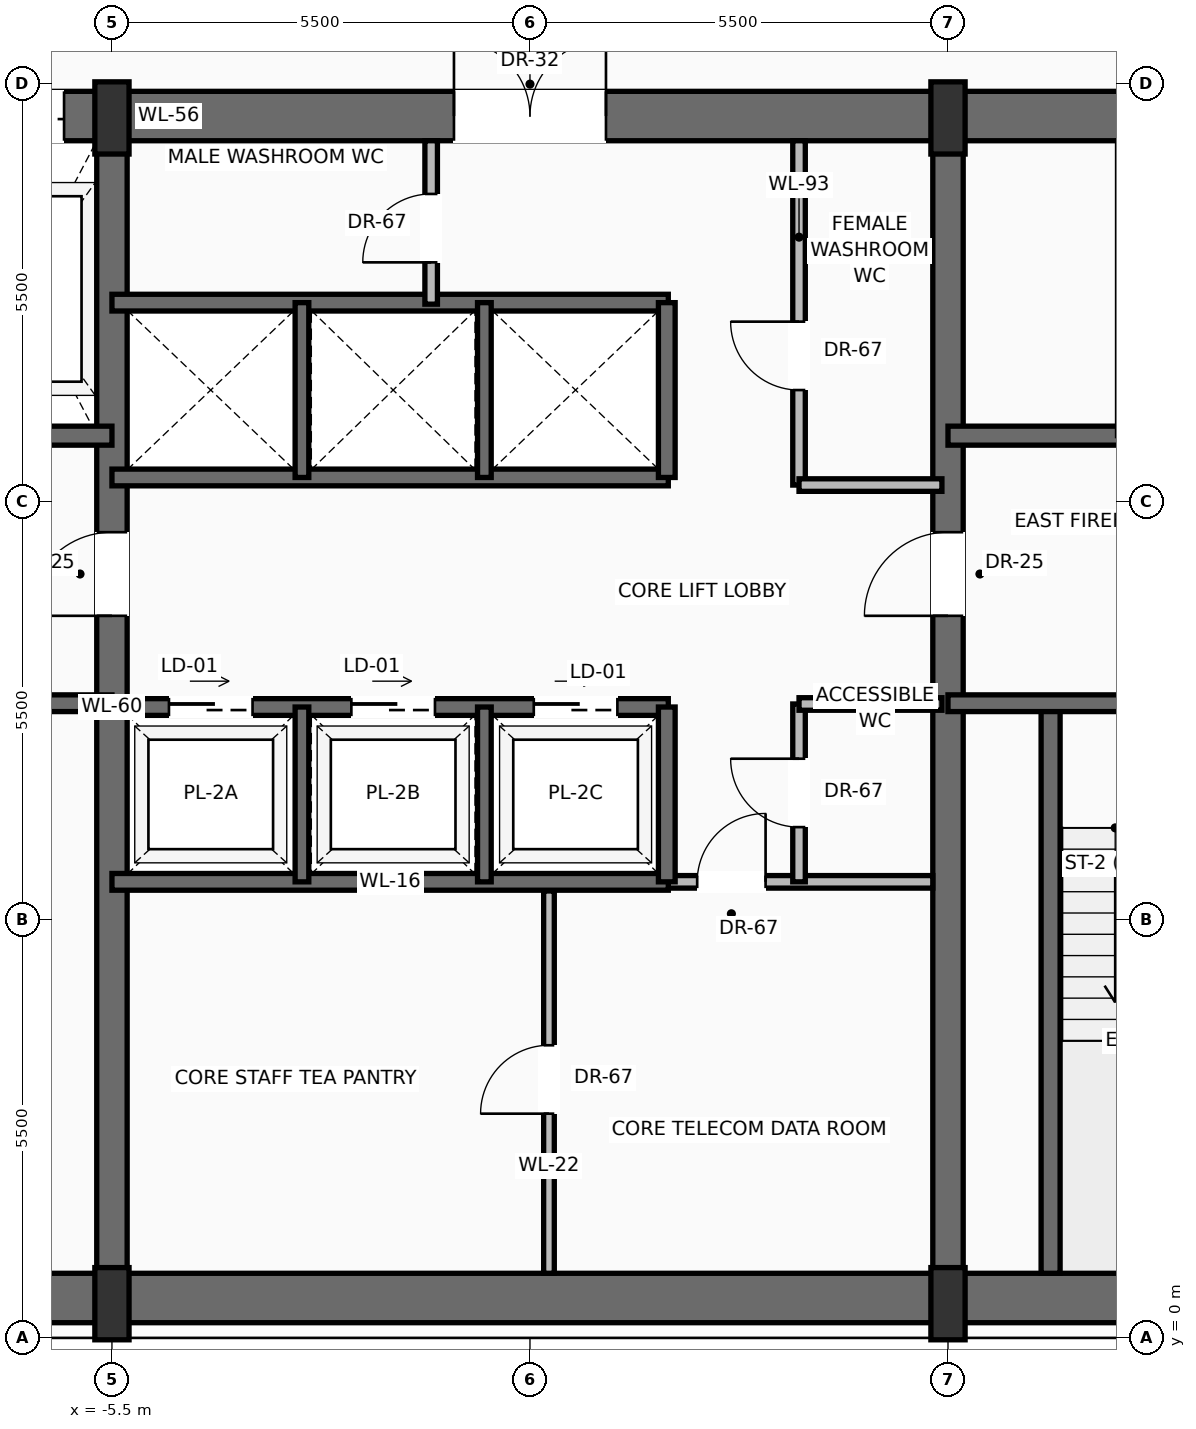
"""IFC4 building model, lengths in metres.
Left out: names, types, materials, properties, quantities, classifications, styles, units other than length and angle.
Written with IfcOpenShell. Run it as: python <this file> out.ifc"""

import sys

from ifc_helpers import new_model, si_unit, direction, frame, frame_2d, origin, origin_2d, place, context, subcontext, project, spatial, rectangle, extrude, source, transform, mapped, element, fill, save


model = new_model("IFC4")
c1 = context("Model", 3, precision=1e-05, world=origin(), true_north=direction((0.0, 1.0)))
c2 = subcontext(c1, "Body", "Model", "MODEL_VIEW")
j1 = project(units=[si_unit("LENGTHUNIT", "METRE"), si_unit("PLANEANGLEUNIT", "RADIAN")], contexts=[c1])
p1 = place(None, origin())
s1 = spatial("IfcSite", under=j1, at=p1, CompositionType="ELEMENT")
p2 = place(p1, origin())
s2 = spatial("IfcBuilding", under=s1, at=p2, CompositionType="ELEMENT")
p3 = place(p2, frame((0.0, 0.0, 140.4)))
s3 = spatial("IfcBuildingStorey", under=s2, at=p3, CompositionType="ELEMENT", Elevation=140.4)
p4 = place(p3, frame((-10.65, 0.525, 0.0), z_axis=(0.0, 0.0, 1.0), x_axis=(1.0, 0.0, 0.0)))
e1 = element("IfcWall", 1, at=p4, inside=s3, PredefinedType="SHEAR", context=c2, shape_type="SweptSolid", body=[
    extrude(rectangle(XDim=21.3, YDim=0.65, at=frame_2d((10.65, 0.0))), origin(), (0.0, 0.0, 1.0), 3.47),
])
p5 = place(p3, frame((-10.8, 16.075, 0.0), z_axis=(0.0, 0.0, 1.0), x_axis=(1.0, 0.0, 0.0)))
e2 = element("IfcWall", 2, at=p5, inside=s3, PredefinedType="SHEAR", context=c2, shape_type="SweptSolid", body=[
    extrude(rectangle(XDim=21.6, YDim=0.65, at=frame_2d((10.8, 0.0))), origin(), (0.0, 0.0, 1.0), 3.47),
])
p6 = place(p5, frame((3.37, 0.0, 0.0)))
e3 = element("IfcOpeningElement", 3, at=p6, cuts=e2, PredefinedType="OPENING", context=c2, shape_type="SweptSolid", body=[
    extrude(rectangle(XDim=1.3, YDim=2.3, at=frame_2d((0.65, 1.15))), frame((0.0, 0.335, 0.0), z_axis=(0.0, -1.0, 0.0), x_axis=(1.0, 0.0, 0.0)), (0.0, 0.0, 1.0), 0.67),
])
p7 = place(p5, frame((9.8, 0.0, 0.0)))
e4 = element("IfcOpeningElement", 4, at=p7, cuts=e2, PredefinedType="OPENING", context=c2, shape_type="SweptSolid", body=[
    extrude(rectangle(XDim=2.0, YDim=2.4, at=frame_2d((1.0, 1.2))), frame((0.0, 0.335, 0.0), z_axis=(0.0, -1.0, 0.0), x_axis=(1.0, 0.0, 0.0)), (0.0, 0.0, 1.0), 0.67),
])
p8 = place(p3, frame((-5.5, 0.525, 0.0), z_axis=(0.0, 0.0, 1.0), x_axis=(0.0, 1.0, 0.0)))
e5 = element("IfcWall", 5, at=p8, inside=s3, PredefinedType="SHEAR", context=c2, shape_type="SweptSolid", body=[
    extrude(rectangle(XDim=15.55, YDim=0.4, at=frame_2d((7.775, 0.0))), origin(), (0.0, 0.0, 1.0), 3.47),
])
p9 = place(p8, frame((8.975, 0.0, 0.0)))
e6 = element("IfcOpeningElement", 6, at=p9, cuts=e5, PredefinedType="OPENING", context=c2, shape_type="SweptSolid", body=[
    extrude(rectangle(XDim=1.1, YDim=2.2, at=frame_2d((0.55, 1.1))), frame((0.0, 0.21, 0.0), z_axis=(0.0, -1.0, 0.0), x_axis=(1.0, 0.0, 0.0)), (0.0, 0.0, 1.0), 0.42),
])
p10 = place(p3, frame((5.5, 0.525, 0.0), z_axis=(0.0, 0.0, 1.0), x_axis=(0.0, 1.0, 0.0)))
e7 = element("IfcWall", 7, at=p10, inside=s3, PredefinedType="SHEAR", context=c2, shape_type="SweptSolid", body=[
    extrude(rectangle(XDim=15.55, YDim=0.4, at=frame_2d((7.775, 0.0))), origin(), (0.0, 0.0, 1.0), 3.47),
])
p11 = place(p10, frame((8.975, 0.0, 0.0)))
e8 = element("IfcOpeningElement", 8, at=p11, cuts=e7, PredefinedType="OPENING", context=c2, shape_type="SweptSolid", body=[
    extrude(rectangle(XDim=1.1, YDim=2.2, at=frame_2d((0.55, 1.1))), frame((0.0, 0.21, 0.0), z_axis=(0.0, -1.0, 0.0), x_axis=(1.0, 0.0, 0.0)), (0.0, 0.0, 1.0), 0.42),
])
m1 = source(origin(), c2, "Body", "SweptSolid", [
    extrude(rectangle(XDim=0.45, YDim=0.95, at=origin_2d()), origin(), (0.0, 0.0, 1.0), 3.7),
])
for number, where, z_axis, x_axis in (
    (9, (-5.5, 0.45, 0.0), (0.0, 0.0, 1.0), (1.0, 0.0, 0.0)),
    (10, (5.5, 0.45, 0.0), (0.0, 0.0, 1.0), (1.0, 0.0, 0.0)),
    (11, (-5.5, 16.05, 0.0), (0.0, 0.0, 1.0), (1.0, 0.0, 0.0)),
    (12, (5.5, 16.05, 0.0), (0.0, 0.0, 1.0), (1.0, 0.0, 0.0)),
):
    element("IfcColumn", number, at=place(p3, frame(where, z_axis=z_axis, x_axis=x_axis)), inside=s3, PredefinedType="PILASTER", context=c2, shape_type="MappedRepresentation", body=[
        mapped(m1, transform((0.0, 0.0, 0.0), scale=1.0)),
    ])
p12 = place(p3, frame((-5.5, 8.35, 0.0), z_axis=(0.0, 0.0, 1.0), x_axis=(-1.0, 0.0, 0.0)))
e13 = element("IfcWall", 13, at=p12, inside=s3, PredefinedType="SOLIDWALL", context=c2, shape_type="SweptSolid", body=[
    extrude(rectangle(XDim=4.65, YDim=0.22, at=frame_2d((2.325, 0.0))), origin(), (0.0, 0.0, 1.0), 3.47),
])
p13 = place(p12, frame((2.5, 0.0, 0.0)))
e14 = element("IfcOpeningElement", 14, at=p13, cuts=e13, PredefinedType="OPENING", context=c2, shape_type="SweptSolid", body=[
    extrude(rectangle(XDim=1.15, YDim=2.2, at=frame_2d((0.575, 1.1))), frame((0.0, 0.12, 0.0), z_axis=(0.0, -1.0, 0.0), x_axis=(1.0, 0.0, 0.0)), (0.0, 0.0, 1.0), 0.24),
])
p14 = place(p3, frame((-5.5, 11.87, 0.0), z_axis=(0.0, 0.0, 1.0), x_axis=(-1.0, 0.0, 0.0)))
e15 = element("IfcWall", 15, at=p14, inside=s3, PredefinedType="SOLIDWALL", context=c2, shape_type="SweptSolid", body=[
    extrude(rectangle(XDim=4.65, YDim=0.25, at=frame_2d((2.325, 0.0))), origin(), (0.0, 0.0, 1.0), 3.47),
])
p15 = place(p14, frame((2.95, 0.0, 0.0)))
e16 = element("IfcOpeningElement", 16, at=p15, cuts=e15, PredefinedType="OPENING", context=c2, shape_type="SweptSolid", body=[
    extrude(rectangle(XDim=1.2, YDim=2.25, at=frame_2d((0.6, 1.125))), frame((0.0, 0.135, 0.0), z_axis=(0.0, -1.0, 0.0), x_axis=(1.0, 0.0, 0.0)), (0.0, 0.0, 1.0), 0.27),
])
p16 = place(p3, frame((6.85, 0.85, 0.0), z_axis=(0.0, 0.0, 1.0), x_axis=(0.0, 1.0, 0.0)))
e17 = element("IfcWall", 17, at=p16, inside=s3, PredefinedType="SOLIDWALL", context=c2, shape_type="SweptSolid", body=[
    extrude(rectangle(XDim=7.5, YDim=0.25, at=frame_2d((3.75, 0.0))), origin(), (0.0, 0.0, 1.0), 3.47),
])
p17 = place(p3, frame((10.15, 8.35, 0.0), z_axis=(0.0, 0.0, 1.0), x_axis=(-1.0, 0.0, 0.0)))
e18 = element("IfcWall", 18, at=p17, inside=s3, PredefinedType="SOLIDWALL", context=c2, shape_type="SweptSolid", body=[
    extrude(rectangle(XDim=4.65, YDim=0.22, at=frame_2d((2.325, 0.0))), origin(), (0.0, 0.0, 1.0), 3.47),
])
p18 = place(p17, frame((1.0, 0.0, 0.0)))
e19 = element("IfcOpeningElement", 19, at=p18, cuts=e18, PredefinedType="OPENING", context=c2, shape_type="SweptSolid", body=[
    extrude(rectangle(XDim=1.15, YDim=2.2, at=frame_2d((0.575, 1.1))), frame((0.0, 0.12, 0.0), z_axis=(0.0, -1.0, 0.0), x_axis=(1.0, 0.0, 0.0)), (0.0, 0.0, 1.0), 0.24),
])
p19 = place(p3, frame((10.15, 11.87, 0.0), z_axis=(0.0, 0.0, 1.0), x_axis=(-1.0, 0.0, 0.0)))
e20 = element("IfcWall", 20, at=p19, inside=s3, PredefinedType="SOLIDWALL", context=c2, shape_type="SweptSolid", body=[
    extrude(rectangle(XDim=4.65, YDim=0.25, at=frame_2d((2.325, 0.0))), origin(), (0.0, 0.0, 1.0), 3.47),
])
p20 = place(p19, frame((0.5, 0.0, 0.0)))
e21 = element("IfcOpeningElement", 21, at=p20, cuts=e20, PredefinedType="OPENING", context=c2, shape_type="SweptSolid", body=[
    extrude(rectangle(XDim=1.2, YDim=2.25, at=frame_2d((0.6, 1.125))), frame((0.0, 0.135, 0.0), z_axis=(0.0, -1.0, 0.0), x_axis=(1.0, 0.0, 0.0)), (0.0, 0.0, 1.0), 0.27),
])
p21 = place(p3, frame((1.82, 6.0, 0.0), z_axis=(0.0, 0.0, 1.0), x_axis=(1.0, 0.0, 0.0)))
e22 = element("IfcWall", 22, at=p21, inside=s3, PredefinedType="PARTITIONING", context=c2, shape_type="SweptSolid", body=[
    extrude(rectangle(XDim=3.48, YDim=0.165, at=frame_2d((1.74, 0.0))), origin(), (0.0, 0.0, 1.0), 3.462),
])
p22 = place(p21, frame((0.38, 0.0, 0.0)))
e23 = element("IfcOpeningElement", 23, at=p22, cuts=e22, PredefinedType="OPENING", context=c2, shape_type="SweptSolid", body=[
    extrude(rectangle(XDim=0.9, YDim=2.1, at=frame_2d((0.45, 1.05))), frame((0.0, 0.093, 0.0), z_axis=(0.0, -1.0, 0.0), x_axis=(1.0, 0.0, 0.0)), (0.0, 0.0, 1.0), 0.185),
])
p23 = place(p3, frame((0.25, 0.85, 0.0), z_axis=(0.0, 0.0, 1.0), x_axis=(0.0, 1.0, 0.0)))
e24 = element("IfcWall", 24, at=p23, inside=s3, PredefinedType="PARTITIONING", context=c2, shape_type="SweptSolid", body=[
    extrude(rectangle(XDim=5.03, YDim=0.14, at=frame_2d((2.515, 0.0))), origin(), (0.0, 0.0, 1.0), 3.462),
])
p24 = place(p23, frame((2.1, 0.0, 0.0)))
e25 = element("IfcOpeningElement", 25, at=p24, cuts=e24, PredefinedType="OPENING", context=c2, shape_type="SweptSolid", body=[
    extrude(rectangle(XDim=0.9, YDim=2.1, at=frame_2d((0.45, 1.05))), frame((0.0, 0.08, 0.0), z_axis=(0.0, -1.0, 0.0), x_axis=(1.0, 0.0, 0.0)), (0.0, 0.0, 1.0), 0.16),
])
p25 = place(p3, frame((3.54, 6.0, 0.0), z_axis=(0.0, 0.0, 1.0), x_axis=(0.0, 1.0, 0.0)))
e26 = element("IfcWall", 26, at=p25, inside=s3, PredefinedType="PARTITIONING", context=c2, shape_type="SweptSolid", body=[
    extrude(rectangle(XDim=2.34, YDim=0.165, at=frame_2d((1.17, 0.0))), origin(), (0.0, 0.0, 1.0), 3.462),
])
p26 = place(p25, frame((0.72, 0.0, 0.0)))
e27 = element("IfcOpeningElement", 27, at=p26, cuts=e26, PredefinedType="OPENING", context=c2, shape_type="SweptSolid", body=[
    extrude(rectangle(XDim=0.9, YDim=2.1, at=frame_2d((0.45, 1.05))), frame((0.0, 0.093, 0.0), z_axis=(0.0, -1.0, 0.0), x_axis=(1.0, 0.0, 0.0)), (0.0, 0.0, 1.0), 0.185),
])
p27 = place(p3, frame((3.54, 8.34, 0.0), z_axis=(0.0, 0.0, 1.0), x_axis=(1.0, 0.0, 0.0)))
e28 = element("IfcWall", 28, at=p27, inside=s3, PredefinedType="PARTITIONING", context=c2, shape_type="SweptSolid", body=[
    extrude(rectangle(XDim=1.88, YDim=0.165, at=frame_2d((0.94, 0.0))), origin(), (0.0, 0.0, 1.0), 3.462),
])
p28 = place(p3, frame((-5.5, 6.0, 0.0), z_axis=(0.0, 0.0, 1.0), x_axis=(1.0, 0.0, 0.0)))
e29 = element("IfcWall", 29, at=p28, inside=s3, PredefinedType="SOLIDWALL", context=c2, shape_type="SweptSolid", body=[
    extrude(rectangle(XDim=7.32, YDim=0.22, at=frame_2d((3.66, 0.0))), origin(), (0.0, 0.0, 1.0), 3.47),
])
p29 = place(p3, frame((-5.5, 8.3, 0.0), z_axis=(0.0, 0.0, 1.0), x_axis=(1.0, 0.0, 0.0)))
e30 = element("IfcWall", 30, at=p29, inside=s3, PredefinedType="SOLIDWALL", context=c2, shape_type="SweptSolid", body=[
    extrude(rectangle(XDim=7.32, YDim=0.22, at=frame_2d((3.66, 0.0))), origin(), (0.0, 0.0, 1.0), 3.47),
])
p30 = place(p29, frame((0.75, 0.0, 0.0)))
e31 = element("IfcOpeningElement", 31, at=p30, cuts=e30, PredefinedType="OPENING", context=c2, shape_type="SweptSolid", body=[
    extrude(rectangle(XDim=1.1, YDim=2.2, at=frame_2d((0.55, 1.1))), frame((0.0, 0.12, 0.0), z_axis=(0.0, -1.0, 0.0), x_axis=(1.0, 0.0, 0.0)), (0.0, 0.0, 1.0), 0.24),
])
p31 = place(p29, frame((3.15, 0.0, 0.0)))
e32 = element("IfcOpeningElement", 32, at=p31, cuts=e30, PredefinedType="OPENING", context=c2, shape_type="SweptSolid", body=[
    extrude(rectangle(XDim=1.1, YDim=2.2, at=frame_2d((0.55, 1.1))), frame((0.0, 0.12, 0.0), z_axis=(0.0, -1.0, 0.0), x_axis=(1.0, 0.0, 0.0)), (0.0, 0.0, 1.0), 0.24),
])
p32 = place(p29, frame((5.55, 0.0, 0.0)))
e33 = element("IfcOpeningElement", 33, at=p32, cuts=e30, PredefinedType="OPENING", context=c2, shape_type="SweptSolid", body=[
    extrude(rectangle(XDim=1.1, YDim=2.2, at=frame_2d((0.55, 1.1))), frame((0.0, 0.12, 0.0), z_axis=(0.0, -1.0, 0.0), x_axis=(1.0, 0.0, 0.0)), (0.0, 0.0, 1.0), 0.24),
])
p33 = place(p3, frame((1.8, 6.0, 0.0), z_axis=(0.0, 0.0, 1.0), x_axis=(0.0, 1.0, 0.0)))
e34 = element("IfcWall", 34, at=p33, inside=s3, PredefinedType="SOLIDWALL", context=c2, shape_type="SweptSolid", body=[
    extrude(rectangle(XDim=2.3, YDim=0.22, at=frame_2d((1.15, 0.0))), origin(), (0.0, 0.0, 1.0), 3.47),
])
for number, where, z_axis, x_axis in (
    (35, (-3.0, 6.0, 0.0), (0.0, 0.0, 1.0), (0.0, 1.0, 0.0)),
    (36, (-0.6, 6.0, 0.0), (0.0, 0.0, 1.0), (0.0, 1.0, 0.0)),
):
    element("IfcWall", number, at=place(p3, frame(where, z_axis=z_axis, x_axis=x_axis)), inside=s3, PredefinedType="SOLIDWALL", context=c2, shape_type="SweptSolid", body=[
        extrude(rectangle(XDim=2.3, YDim=0.18, at=frame_2d((1.15, 0.0))), origin(), (0.0, 0.0, 1.0), 3.47),
    ])
for number, where, z_axis, x_axis in (
    (37, (-5.5, 11.32, 0.0), (0.0, 0.0, 1.0), (1.0, 0.0, 0.0)),
    (38, (-5.5, 13.62, 0.0), (0.0, 0.0, 1.0), (1.0, 0.0, 0.0)),
):
    element("IfcWall", number, at=place(p3, frame(where, z_axis=z_axis, x_axis=x_axis)), inside=s3, PredefinedType="SOLIDWALL", context=c2, shape_type="SweptSolid", body=[
        extrude(rectangle(XDim=7.32, YDim=0.22, at=frame_2d((3.66, 0.0))), origin(), (0.0, 0.0, 1.0), 3.47),
    ])
p34 = place(p3, frame((1.8, 11.32, 0.0), z_axis=(0.0, 0.0, 1.0), x_axis=(0.0, 1.0, 0.0)))
e39 = element("IfcWall", 39, at=p34, inside=s3, PredefinedType="SOLIDWALL", context=c2, shape_type="SweptSolid", body=[
    extrude(rectangle(XDim=2.3, YDim=0.22, at=frame_2d((1.15, 0.0))), origin(), (0.0, 0.0, 1.0), 3.47),
])
for number, where, z_axis, x_axis in (
    (40, (-3.0, 11.32, 0.0), (0.0, 0.0, 1.0), (0.0, 1.0, 0.0)),
    (41, (-0.6, 11.32, 0.0), (0.0, 0.0, 1.0), (0.0, 1.0, 0.0)),
):
    element("IfcWall", number, at=place(p3, frame(where, z_axis=z_axis, x_axis=x_axis)), inside=s3, PredefinedType="SOLIDWALL", context=c2, shape_type="SweptSolid", body=[
        extrude(rectangle(XDim=2.3, YDim=0.18, at=frame_2d((1.15, 0.0))), origin(), (0.0, 0.0, 1.0), 3.47),
    ])
p35 = place(p3, frame((-1.3, 13.6, 0.0), z_axis=(0.0, 0.0, 1.0), x_axis=(0.0, 1.0, 0.0)))
e42 = element("IfcWall", 42, at=p35, inside=s3, PredefinedType="PARTITIONING", context=c2, shape_type="SweptSolid", body=[
    extrude(rectangle(XDim=2.15, YDim=0.165, at=frame_2d((1.075, 0.0))), origin(), (0.0, 0.0, 1.0), 3.462),
])
p36 = place(p35, frame((0.55, 0.0, 0.0)))
e43 = element("IfcOpeningElement", 43, at=p36, cuts=e42, PredefinedType="OPENING", context=c2, shape_type="SweptSolid", body=[
    extrude(rectangle(XDim=0.9, YDim=2.1, at=frame_2d((0.45, 1.05))), frame((0.0, 0.093, 0.0), z_axis=(0.0, -1.0, 0.0), x_axis=(1.0, 0.0, 0.0)), (0.0, 0.0, 1.0), 0.185),
])
p37 = place(p3, frame((3.54, 11.22, 0.0), z_axis=(0.0, 0.0, 1.0), x_axis=(0.0, 1.0, 0.0)))
e44 = element("IfcWall", 44, at=p37, inside=s3, PredefinedType="PARTITIONING", context=c2, shape_type="SweptSolid", body=[
    extrude(rectangle(XDim=4.53, YDim=0.165, at=frame_2d((2.265, 0.0))), origin(), (0.0, 0.0, 1.0), 3.462),
])
p38 = place(p37, frame((1.25, 0.0, 0.0)))
e45 = element("IfcOpeningElement", 45, at=p38, cuts=e44, PredefinedType="OPENING", context=c2, shape_type="SweptSolid", body=[
    extrude(rectangle(XDim=0.9, YDim=2.1, at=frame_2d((0.45, 1.05))), frame((0.0, 0.093, 0.0), z_axis=(0.0, -1.0, 0.0), x_axis=(1.0, 0.0, 0.0)), (0.0, 0.0, 1.0), 0.185),
])
p39 = place(p3, frame((3.54, 11.22, 0.0), z_axis=(0.0, 0.0, 1.0), x_axis=(1.0, 0.0, 0.0)))
e46 = element("IfcWall", 46, at=p39, inside=s3, PredefinedType="PARTITIONING", context=c2, shape_type="SweptSolid", body=[
    extrude(rectangle(XDim=1.88, YDim=0.165, at=frame_2d((0.94, 0.0))), origin(), (0.0, 0.0, 1.0), 3.462),
])
m2 = source(origin(), c2, "Body", "SweptSolid", [
    extrude(rectangle(XDim=1.1, YDim=2.2, at=frame_2d((0.55, 1.1))), frame((0.0, 0.025, 0.0), z_axis=(0.0, -1.0, 0.0), x_axis=(1.0, 0.0, 0.0)), (0.0, 0.0, 1.0), 0.05),
])
p40 = place(p9, origin())
e47 = element("IfcDoor", 47, at=p40, inside=s3, OperationType="SINGLE_SWING_LEFT", PredefinedType="DOOR", context=c2, shape_type="MappedRepresentation", body=[
    mapped(m2, transform((0.0, 0.0, 0.0), scale=1.0)),
])
fill(e6, e47)
m3 = source(origin(), c2, "Body", "SweptSolid", [
    extrude(rectangle(XDim=1.3, YDim=2.3, at=frame_2d((0.65, 1.15))), frame((0.0, 0.025, 0.0), z_axis=(0.0, -1.0, 0.0), x_axis=(1.0, 0.0, 0.0)), (0.0, 0.0, 1.0), 0.05),
])
p41 = place(p6, origin())
e48 = element("IfcDoor", 48, at=p41, inside=s3, OperationType="SLIDING_TO_RIGHT", PredefinedType="DOOR", context=c2, shape_type="MappedRepresentation", body=[
    mapped(m3, transform((0.0, 0.0, 0.0), scale=1.0)),
])
fill(e3, e48)
p42 = place(p11, origin())
e49 = element("IfcDoor", 49, at=p42, inside=s3, OperationType="SINGLE_SWING_LEFT", PredefinedType="DOOR", context=c2, shape_type="MappedRepresentation", body=[
    mapped(m2, transform((0.0, 0.0, 0.0), scale=1.0)),
])
fill(e8, e49)
m4 = source(origin(), c2, "Body", "SweptSolid", [
    extrude(rectangle(XDim=2.0, YDim=2.4, at=frame_2d((1.0, 1.2))), frame((0.0, 0.025, 0.0), z_axis=(0.0, -1.0, 0.0), x_axis=(1.0, 0.0, 0.0)), (0.0, 0.0, 1.0), 0.05),
])
p43 = place(p7, origin())
e50 = element("IfcDoor", 50, at=p43, inside=s3, OperationType="DOUBLE_DOOR_SINGLE_SWING", PredefinedType="DOOR", context=c2, shape_type="MappedRepresentation", body=[
    mapped(m4, transform((0.0, 0.0, 0.0), scale=1.0)),
])
fill(e4, e50)
m5 = source(origin(), c2, "Body", "SweptSolid", [
    extrude(rectangle(XDim=0.9, YDim=2.1, at=frame_2d((0.45, 1.05))), frame((0.0, 0.025, 0.0), z_axis=(0.0, -1.0, 0.0), x_axis=(1.0, 0.0, 0.0)), (0.0, 0.0, 1.0), 0.05),
])
p44 = place(p22, origin())
e51 = element("IfcDoor", 51, at=p44, inside=s3, OperationType="SINGLE_SWING_RIGHT", PredefinedType="DOOR", context=c2, shape_type="MappedRepresentation", body=[
    mapped(m5, transform((0.0, 0.0, 0.0), scale=1.0)),
])
fill(e23, e51)
p45 = place(p24, origin())
e52 = element("IfcDoor", 52, at=p45, inside=s3, OperationType="SINGLE_SWING_LEFT", PredefinedType="DOOR", context=c2, shape_type="MappedRepresentation", body=[
    mapped(m5, transform((0.0, 0.0, 0.0), scale=1.0)),
])
fill(e25, e52)
p46 = place(p26, origin())
e53 = element("IfcDoor", 53, at=p46, inside=s3, OperationType="SINGLE_SWING_RIGHT", PredefinedType="DOOR", context=c2, shape_type="MappedRepresentation", body=[
    mapped(m5, transform((0.0, 0.0, 0.0), scale=1.0)),
])
fill(e27, e53)
m6 = source(origin(), c2, "Body", "SweptSolid", [
    extrude(rectangle(XDim=1.1, YDim=2.2, at=frame_2d((0.55, 1.1))), frame((0.0, 0.025, 0.0), z_axis=(0.0, -1.0, 0.0), x_axis=(1.0, 0.0, 0.0)), (0.0, 0.0, 1.0), 0.05),
])
p47 = place(p30, origin())
e54 = element("IfcDoor", 54, at=p47, inside=s3, OperationType="SLIDING_TO_LEFT", PredefinedType="DOOR", context=c2, shape_type="MappedRepresentation", body=[
    mapped(m6, transform((0.0, 0.0, 0.0), scale=1.0)),
])
fill(e31, e54)
p48 = place(p31, origin())
e55 = element("IfcDoor", 55, at=p48, inside=s3, OperationType="SLIDING_TO_LEFT", PredefinedType="DOOR", context=c2, shape_type="MappedRepresentation", body=[
    mapped(m6, transform((0.0, 0.0, 0.0), scale=1.0)),
])
fill(e32, e55)
p49 = place(p32, origin())
e56 = element("IfcDoor", 56, at=p49, inside=s3, OperationType="SLIDING_TO_LEFT", PredefinedType="DOOR", context=c2, shape_type="MappedRepresentation", body=[
    mapped(m6, transform((0.0, 0.0, 0.0), scale=1.0)),
])
fill(e33, e56)
p50 = place(p36, origin())
e57 = element("IfcDoor", 57, at=p50, inside=s3, OperationType="SINGLE_SWING_LEFT", PredefinedType="DOOR", context=c2, shape_type="MappedRepresentation", body=[
    mapped(m5, transform((0.0, 0.0, 0.0), scale=1.0)),
])
fill(e43, e57)
p51 = place(p38, origin())
e58 = element("IfcDoor", 58, at=p51, inside=s3, OperationType="SINGLE_SWING_RIGHT", PredefinedType="DOOR", context=c2, shape_type="MappedRepresentation", body=[
    mapped(m5, transform((0.0, 0.0, 0.0), scale=1.0)),
])
fill(e45, e58)
save(model, sys.argv[1])
